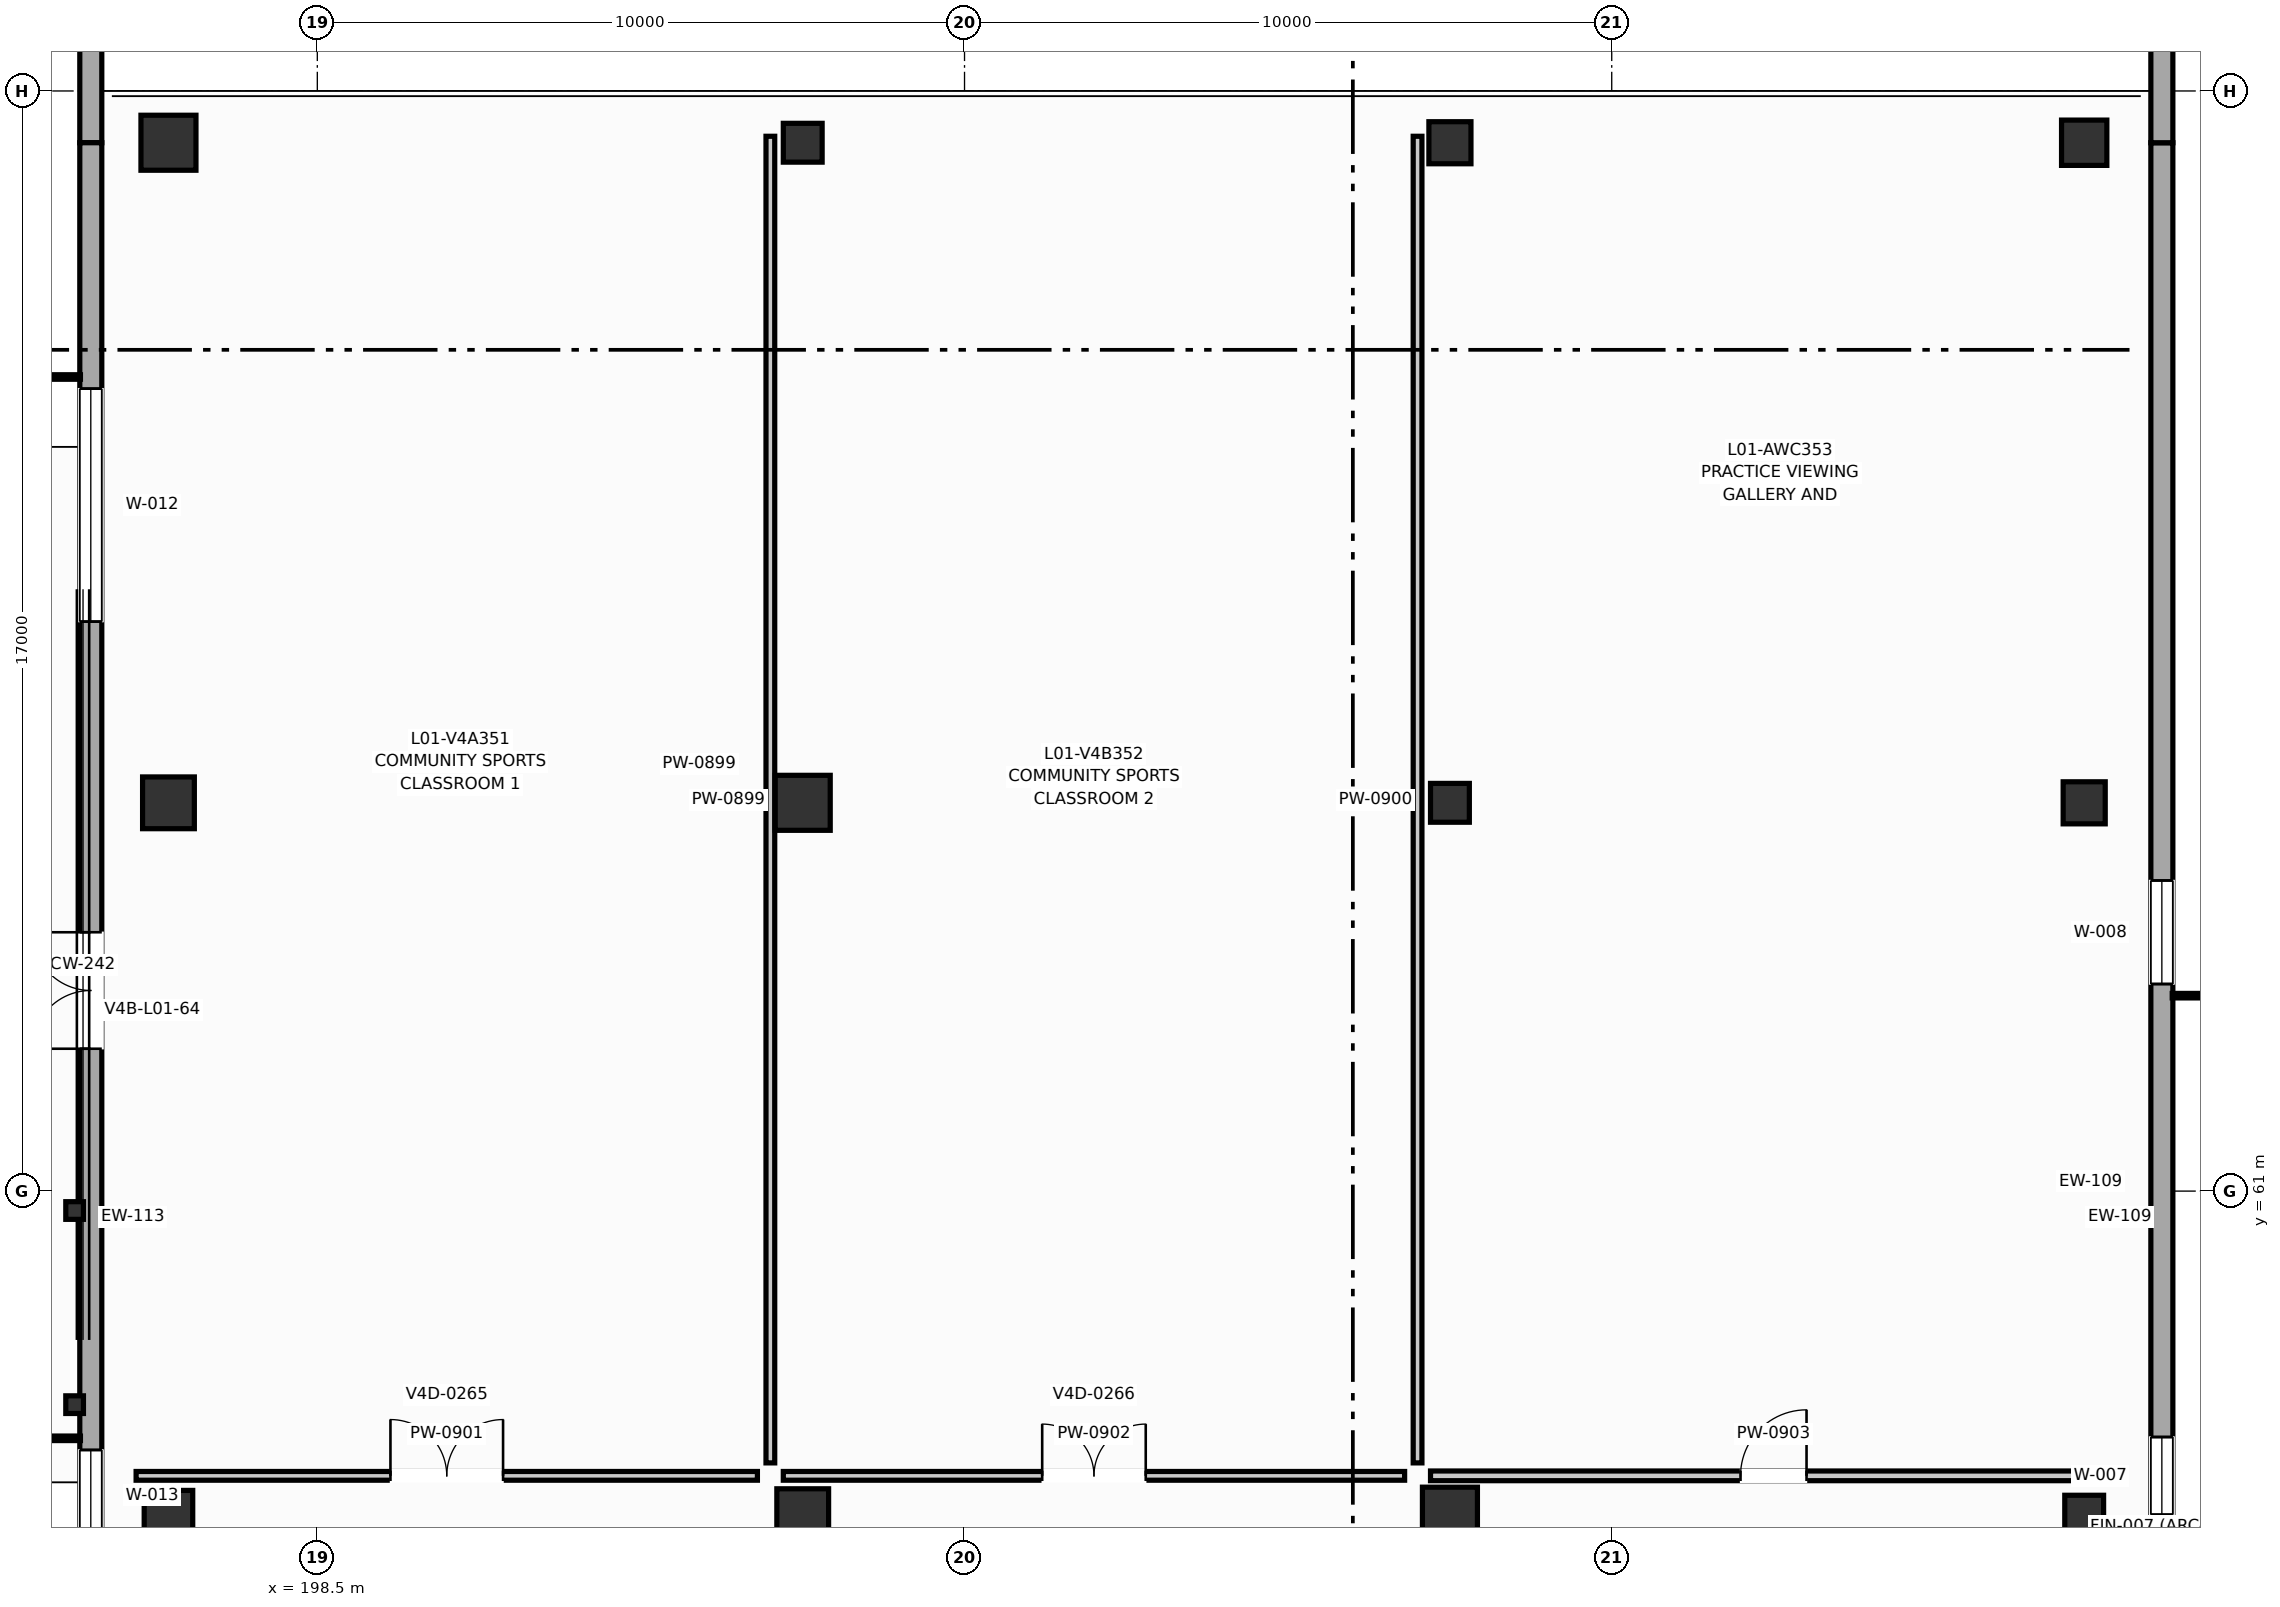
"""IFC4 building model, lengths in metres.
Left out: names, types, materials, properties, quantities, classifications, styles, units other than length and angle.
Written with IfcOpenShell. Run it as: python <this file> out.ifc"""

import sys

from ifc_helpers import new_model, si_unit, direction, frame, frame_2d, origin, origin_2d, place, context, subcontext, project, spatial, rectangle, hollow_circle, extrude, element, fill, save


model = new_model("IFC4")
c1 = context("Model", 3, precision=1e-05, world=origin(), true_north=direction((0.0, 1.0)))
c2 = subcontext(c1, "Body", "Model", "MODEL_VIEW")
j1 = project(units=[si_unit("LENGTHUNIT", "METRE"), si_unit("PLANEANGLEUNIT", "RADIAN")], contexts=[c1])
p1 = place(None, origin())
s1 = spatial("IfcSite", under=j1, at=p1, CompositionType="ELEMENT")
p2 = place(p1, origin())
s2 = spatial("IfcBuilding", under=s1, at=p2, CompositionType="ELEMENT")
p3 = place(p2, frame((0.0, 0.0, 4.5)))
s3 = spatial("IfcBuildingStorey", under=s2, at=p3, CompositionType="ELEMENT", Elevation=4.5)
p4 = place(p3, frame((196.2, 56.0, 0.0), z_axis=(0.0, 0.0, 1.0), x_axis=(1.0, 0.0, 0.0)))
e1 = element("IfcColumn", 1, at=p4, inside=s3, PredefinedType="COLUMN", context=c2, shape_type="SweptSolid", body=[
    extrude(rectangle(XDim=0.75, YDim=0.75, at=origin_2d()), origin(), (0.0, 0.0, 1.0), 4.5),
])
p5 = place(p3, frame((196.2, 67.0, 0.0), z_axis=(0.0, 0.0, 1.0), x_axis=(1.0, 0.0, 0.0)))
e2 = element("IfcColumn", 2, at=p5, inside=s3, PredefinedType="COLUMN", context=c2, shape_type="SweptSolid", body=[
    extrude(rectangle(XDim=0.8, YDim=0.8, at=origin_2d()), origin(), (0.0, 0.0, 1.0), 4.5),
])
p6 = place(p3, frame((196.2, 77.2, 0.0), z_axis=(0.0, 0.0, 1.0), x_axis=(1.0, 0.0, 0.0)))
e3 = element("IfcColumn", 3, at=p6, inside=s3, PredefinedType="COLUMN", context=c2, shape_type="SweptSolid", body=[
    extrude(rectangle(XDim=0.85, YDim=0.85, at=origin_2d()), origin(), (0.0, 0.0, 1.0), 4.5),
])
p7 = place(p3, frame((206.0, 56.0, 0.0), z_axis=(0.0, 0.0, 1.0), x_axis=(1.0, 0.0, 0.0)))
e4 = element("IfcColumn", 4, at=p7, inside=s3, PredefinedType="COLUMN", context=c2, shape_type="SweptSolid", body=[
    extrude(rectangle(XDim=0.8, YDim=0.8, at=origin_2d()), origin(), (0.0, 0.0, 1.0), 4.5),
])
p8 = place(p3, frame((206.0, 67.0, 0.0), z_axis=(0.0, 0.0, 1.0), x_axis=(1.0, 0.0, 0.0)))
e5 = element("IfcColumn", 5, at=p8, inside=s3, PredefinedType="COLUMN", context=c2, shape_type="SweptSolid", body=[
    extrude(rectangle(XDim=0.85, YDim=0.85, at=origin_2d()), origin(), (0.0, 0.0, 1.0), 4.5),
])
p9 = place(p3, frame((206.0, 77.2, 0.0), z_axis=(0.0, 0.0, 1.0), x_axis=(1.0, 0.0, 0.0)))
e6 = element("IfcColumn", 6, at=p9, inside=s3, PredefinedType="COLUMN", context=c2, shape_type="SweptSolid", body=[
    extrude(rectangle(XDim=0.6, YDim=0.6, at=origin_2d()), origin(), (0.0, 0.0, 1.0), 4.5),
])
p10 = place(p3, frame((216.0, 56.0, 0.0), z_axis=(0.0, 0.0, 1.0), x_axis=(1.0, 0.0, 0.0)))
e7 = element("IfcColumn", 7, at=p10, inside=s3, PredefinedType="COLUMN", context=c2, shape_type="SweptSolid", body=[
    extrude(rectangle(XDim=0.85, YDim=0.85, at=origin_2d()), origin(), (0.0, 0.0, 1.0), 4.5),
])
p11 = place(p3, frame((216.0, 67.0, 0.0), z_axis=(0.0, 0.0, 1.0), x_axis=(1.0, 0.0, 0.0)))
e8 = element("IfcColumn", 8, at=p11, inside=s3, PredefinedType="COLUMN", context=c2, shape_type="SweptSolid", body=[
    extrude(rectangle(XDim=0.6, YDim=0.6, at=origin_2d()), origin(), (0.0, 0.0, 1.0), 4.5),
])
p12 = place(p3, frame((216.0, 77.2, 0.0), z_axis=(0.0, 0.0, 1.0), x_axis=(1.0, 0.0, 0.0)))
e9 = element("IfcColumn", 9, at=p12, inside=s3, PredefinedType="COLUMN", context=c2, shape_type="SweptSolid", body=[
    extrude(rectangle(XDim=0.65, YDim=0.65, at=origin_2d()), origin(), (0.0, 0.0, 1.0), 4.5),
])
p13 = place(p3, frame((225.8, 56.0, 0.0), z_axis=(0.0, 0.0, 1.0), x_axis=(1.0, 0.0, 0.0)))
e10 = element("IfcColumn", 10, at=p13, inside=s3, PredefinedType="COLUMN", context=c2, shape_type="SweptSolid", body=[
    extrude(rectangle(XDim=0.6, YDim=0.6, at=origin_2d()), origin(), (0.0, 0.0, 1.0), 4.5),
])
p14 = place(p3, frame((225.8, 67.0, 0.0), z_axis=(0.0, 0.0, 1.0), x_axis=(1.0, 0.0, 0.0)))
e11 = element("IfcColumn", 11, at=p14, inside=s3, PredefinedType="COLUMN", context=c2, shape_type="SweptSolid", body=[
    extrude(rectangle(XDim=0.65, YDim=0.65, at=origin_2d()), origin(), (0.0, 0.0, 1.0), 4.5),
])
p15 = place(p3, frame((225.8, 77.2, 0.0), z_axis=(0.0, 0.0, 1.0), x_axis=(1.0, 0.0, 0.0)))
e12 = element("IfcColumn", 12, at=p15, inside=s3, PredefinedType="COLUMN", context=c2, shape_type="SweptSolid", body=[
    extrude(rectangle(XDim=0.7, YDim=0.7, at=origin_2d()), origin(), (0.0, 0.0, 1.0), 4.5),
])
for number, where, z_axis, x_axis in (
    (13, (194.75, 57.7, 0.0), (0.0, 0.0, 1.0), (1.0, 0.0, 0.0)),
    (14, (194.75, 60.7, 0.0), (0.0, 0.0, 1.0), (1.0, 0.0, 0.0)),
):
    element("IfcColumn", number, at=place(p3, frame(where, z_axis=z_axis, x_axis=x_axis)), inside=s3, PredefinedType="COLUMN", context=c2, shape_type="SweptSolid", body=[
        extrude(hollow_circle(Radius=0.136, WallThickness=0.012, at=origin_2d()), origin(), (0.0, 0.0, 1.0), 4.5),
    ])
p16 = place(p3, frame((227.0, 44.0, 0.0), z_axis=(0.0, 0.0, 1.0), x_axis=(0.0, 1.0, 0.0)))
e15 = element("IfcWall", 15, at=p16, inside=s3, PredefinedType="SOLIDWALL", context=c2, shape_type="SweptSolid", body=[
    extrude(rectangle(XDim=33.2, YDim=0.34, at=frame_2d((16.6, 0.0))), origin(), (0.0, 0.0, 1.0), 3.55),
])
p17 = place(p16, frame((3.8, 0.0, 0.85)))
e16 = element("IfcOpeningElement", 16, at=p17, cuts=e15, PredefinedType="OPENING", context=c2, shape_type="SweptSolid", body=[
    extrude(rectangle(XDim=1.5, YDim=2.2, at=frame_2d((0.75, 1.1))), frame((0.0, 0.18, 0.0), z_axis=(0.0, -1.0, 0.0), x_axis=(1.0, 0.0, 0.0)), (0.0, 0.0, 1.0), 0.36),
])
p18 = place(p16, frame((12.0, 0.0, 0.85)))
e17 = element("IfcOpeningElement", 17, at=p18, cuts=e15, PredefinedType="OPENING", context=c2, shape_type="SweptSolid", body=[
    extrude(rectangle(XDim=1.2, YDim=1.8, at=frame_2d((0.6, 0.9))), frame((0.0, 0.18, 0.0), z_axis=(0.0, -1.0, 0.0), x_axis=(1.0, 0.0, 0.0)), (0.0, 0.0, 1.0), 0.36),
])
p19 = place(p16, frame((20.2, 0.0, 0.85)))
e18 = element("IfcOpeningElement", 18, at=p19, cuts=e15, PredefinedType="OPENING", context=c2, shape_type="SweptSolid", body=[
    extrude(rectangle(XDim=1.6, YDim=1.8, at=frame_2d((0.8, 0.9))), frame((0.0, 0.18, 0.0), z_axis=(0.0, -1.0, 0.0), x_axis=(1.0, 0.0, 0.0)), (0.0, 0.0, 1.0), 0.36),
])
p20 = place(p3, frame((227.0, 77.2, 0.0), z_axis=(0.0, 0.0, 1.0), x_axis=(0.0, 1.0, 0.0)))
e19 = element("IfcWall", 19, at=p20, inside=s3, PredefinedType="SOLIDWALL", context=c2, shape_type="SweptSolid", body=[
    extrude(rectangle(XDim=34.8, YDim=0.34, at=frame_2d((17.4, 0.0))), origin(), (0.0, 0.0, 1.0), 4.5),
])
p21 = place(p20, frame((3.8, 0.0, 0.85)))
e20 = element("IfcOpeningElement", 20, at=p21, cuts=e19, PredefinedType="OPENING", context=c2, shape_type="SweptSolid", body=[
    extrude(rectangle(XDim=2.0, YDim=1.6, at=frame_2d((1.0, 0.8))), frame((0.0, 0.18, 0.0), z_axis=(0.0, -1.0, 0.0), x_axis=(1.0, 0.0, 0.0)), (0.0, 0.0, 1.0), 0.36),
])
p22 = place(p20, frame((12.0, 0.0, 0.85)))
e21 = element("IfcOpeningElement", 21, at=p22, cuts=e19, PredefinedType="OPENING", context=c2, shape_type="SweptSolid", body=[
    extrude(rectangle(XDim=2.6, YDim=1.5, at=frame_2d((1.3, 0.75))), frame((0.0, 0.18, 0.0), z_axis=(0.0, -1.0, 0.0), x_axis=(1.0, 0.0, 0.0)), (0.0, 0.0, 1.0), 0.36),
])
p23 = place(p20, frame((20.2, 0.0, 0.85)))
e22 = element("IfcOpeningElement", 22, at=p23, cuts=e19, PredefinedType="OPENING", context=c2, shape_type="SweptSolid", body=[
    extrude(rectangle(XDim=3.2, YDim=1.6, at=frame_2d((1.6, 0.8))), frame((0.0, 0.18, 0.0), z_axis=(0.0, -1.0, 0.0), x_axis=(1.0, 0.0, 0.0)), (0.0, 0.0, 1.0), 0.36),
])
p24 = place(p3, frame((195.0, 112.0, 0.0), z_axis=(0.0, 0.0, 1.0), x_axis=(0.0, -1.0, 0.0)))
e23 = element("IfcWall", 23, at=p24, inside=s3, PredefinedType="SOLIDWALL", context=c2, shape_type="SweptSolid", body=[
    extrude(rectangle(XDim=34.8, YDim=0.34, at=frame_2d((17.4, 0.0))), origin(), (0.0, 0.0, 1.0), 4.5),
])
p25 = place(p3, frame((195.0, 77.2, 0.0), z_axis=(0.0, 0.0, 1.0), x_axis=(0.0, -1.0, 0.0)))
e24 = element("IfcWall", 24, at=p25, inside=s3, PredefinedType="SOLIDWALL", context=c2, shape_type="SweptSolid", body=[
    extrude(rectangle(XDim=33.2, YDim=0.34, at=frame_2d((16.6, 0.0))), origin(), (0.0, 0.0, 1.0), 3.55),
])
p26 = place(p25, frame((12.2, 0.0, 0.0)))
e25 = element("IfcOpeningElement", 25, at=p26, cuts=e24, PredefinedType="OPENING", context=c2, shape_type="SweptSolid", body=[
    extrude(rectangle(XDim=1.8, YDim=2.35, at=frame_2d((0.9, 1.175))), frame((0.0, 0.18, 0.0), z_axis=(0.0, -1.0, 0.0), x_axis=(1.0, 0.0, 0.0)), (0.0, 0.0, 1.0), 0.36),
])
p27 = place(p25, frame((3.8, 0.0, 0.85)))
e26 = element("IfcOpeningElement", 26, at=p27, cuts=e24, PredefinedType="OPENING", context=c2, shape_type="SweptSolid", body=[
    extrude(rectangle(XDim=3.6, YDim=2.2, at=frame_2d((1.8, 1.1))), frame((0.0, 0.18, 0.0), z_axis=(0.0, -1.0, 0.0), x_axis=(1.0, 0.0, 0.0)), (0.0, 0.0, 1.0), 0.36),
])
p28 = place(p25, frame((20.2, 0.0, 0.85)))
e27 = element("IfcOpeningElement", 27, at=p28, cuts=e24, PredefinedType="OPENING", context=c2, shape_type="SweptSolid", body=[
    extrude(rectangle(XDim=1.4, YDim=2.6, at=frame_2d((0.7, 1.3))), frame((0.0, 0.18, 0.0), z_axis=(0.0, -1.0, 0.0), x_axis=(1.0, 0.0, 0.0)), (0.0, 0.0, 1.0), 0.36),
])
for number, where, z_axis, x_axis in (
    (28, (205.5, 56.8, 0.0), (0.0, 0.0, 1.0), (0.0, 1.0, 0.0)),
    (29, (215.5, 56.8, 0.0), (0.0, 0.0, 1.0), (0.0, 1.0, 0.0)),
):
    element("IfcWall", number, at=place(p3, frame(where, z_axis=z_axis, x_axis=x_axis)), inside=s3, PredefinedType="PARTITIONING", context=c2, shape_type="SweptSolid", body=[
        extrude(rectangle(XDim=20.5, YDim=0.135, at=frame_2d((10.25, 0.0))), origin(), (0.0, 0.0, 1.0), 3.22),
    ])
p29 = place(p3, frame((195.7, 56.6, 0.0), z_axis=(0.0, 0.0, 1.0), x_axis=(1.0, 0.0, 0.0)))
e30 = element("IfcWall", 30, at=p29, inside=s3, PredefinedType="PARTITIONING", context=c2, shape_type="SweptSolid", body=[
    extrude(rectangle(XDim=9.6, YDim=0.135, at=frame_2d((4.8, 0.0))), origin(), (0.0, 0.0, 1.0), 3.22),
])
p30 = place(p29, frame((3.93, 0.0, 0.0)))
e31 = element("IfcOpeningElement", 31, at=p30, cuts=e30, PredefinedType="OPENING", context=c2, shape_type="SweptSolid", body=[
    extrude(rectangle(XDim=1.74, YDim=2.3, at=frame_2d((0.87, 1.15))), frame((0.0, 0.077, 0.0), z_axis=(0.0, -1.0, 0.0), x_axis=(1.0, 0.0, 0.0)), (0.0, 0.0, 1.0), 0.155),
])
p31 = place(p3, frame((205.7, 56.6, 0.0), z_axis=(0.0, 0.0, 1.0), x_axis=(1.0, 0.0, 0.0)))
e32 = element("IfcWall", 32, at=p31, inside=s3, PredefinedType="PARTITIONING", context=c2, shape_type="SweptSolid", body=[
    extrude(rectangle(XDim=9.6, YDim=0.135, at=frame_2d((4.8, 0.0))), origin(), (0.0, 0.0, 1.0), 3.22),
])
p32 = place(p31, frame((4.0, 0.0, 0.0)))
e33 = element("IfcOpeningElement", 33, at=p32, cuts=e32, PredefinedType="OPENING", context=c2, shape_type="SweptSolid", body=[
    extrude(rectangle(XDim=1.6, YDim=2.25, at=frame_2d((0.8, 1.125))), frame((0.0, 0.077, 0.0), z_axis=(0.0, -1.0, 0.0), x_axis=(1.0, 0.0, 0.0)), (0.0, 0.0, 1.0), 0.155),
])
p33 = place(p3, frame((215.7, 56.6, 0.0), z_axis=(0.0, 0.0, 1.0), x_axis=(1.0, 0.0, 0.0)))
e34 = element("IfcWall", 34, at=p33, inside=s3, PredefinedType="PARTITIONING", context=c2, shape_type="SweptSolid", body=[
    extrude(rectangle(XDim=10.6, YDim=0.15, at=frame_2d((5.3, 0.0))), origin(), (0.0, 0.0, 1.0), 3.22),
])
p34 = place(p33, frame((4.79, 0.0, 0.0)))
e35 = element("IfcOpeningElement", 35, at=p34, cuts=e34, PredefinedType="OPENING", context=c2, shape_type="SweptSolid", body=[
    extrude(rectangle(XDim=1.02, YDim=2.15, at=frame_2d((0.51, 1.075))), frame((0.0, 0.085, 0.0), z_axis=(0.0, -1.0, 0.0), x_axis=(1.0, 0.0, 0.0)), (0.0, 0.0, 1.0), 0.17),
])
p35 = place(p18, origin())
e36 = element("IfcWindow", 36, at=p35, inside=s3, PartitioningType="SINGLE_PANEL", PredefinedType="WINDOW", context=c2, shape_type="SweptSolid", body=[
    extrude(rectangle(XDim=1.2, YDim=1.8, at=frame_2d((0.6, 0.9))), frame((0.0, 0.03, 0.0), z_axis=(0.0, -1.0, 0.0), x_axis=(1.0, 0.0, 0.0)), (0.0, 0.0, 1.0), 0.06),
])
fill(e17, e36)
p36 = place(p19, origin())
e37 = element("IfcWindow", 37, at=p36, inside=s3, PartitioningType="SINGLE_PANEL", PredefinedType="WINDOW", context=c2, shape_type="SweptSolid", body=[
    extrude(rectangle(XDim=1.6, YDim=1.8, at=frame_2d((0.8, 0.9))), frame((0.0, 0.03, 0.0), z_axis=(0.0, -1.0, 0.0), x_axis=(1.0, 0.0, 0.0)), (0.0, 0.0, 1.0), 0.06),
])
fill(e18, e37)
p37 = place(p26, frame((1.8, 0.0, 0.0), z_axis=(0.0, 0.0, 1.0), x_axis=(-1.0, 0.0, 0.0)))
e38 = element("IfcDoor", 38, at=p37, inside=s3, OperationType="DOUBLE_DOOR_SINGLE_SWING", PredefinedType="DOOR", context=c2, shape_type="SweptSolid", body=[
    extrude(rectangle(XDim=1.8, YDim=2.35, at=frame_2d((0.9, 1.175))), frame((0.0, 0.025, 0.0), z_axis=(0.0, -1.0, 0.0), x_axis=(1.0, 0.0, 0.0)), (0.0, 0.0, 1.0), 0.05),
])
fill(e25, e38)
p38 = place(p27, origin())
e39 = element("IfcWindow", 39, at=p38, inside=s3, PartitioningType="SINGLE_PANEL", PredefinedType="WINDOW", context=c2, shape_type="SweptSolid", body=[
    extrude(rectangle(XDim=3.6, YDim=2.2, at=frame_2d((1.8, 1.1))), frame((0.0, 0.03, 0.0), z_axis=(0.0, -1.0, 0.0), x_axis=(1.0, 0.0, 0.0)), (0.0, 0.0, 1.0), 0.06),
])
fill(e26, e39)
p39 = place(p28, origin())
e40 = element("IfcWindow", 40, at=p39, inside=s3, PartitioningType="SINGLE_PANEL", PredefinedType="WINDOW", context=c2, shape_type="SweptSolid", body=[
    extrude(rectangle(XDim=1.4, YDim=2.6, at=frame_2d((0.7, 1.3))), frame((0.0, 0.03, 0.0), z_axis=(0.0, -1.0, 0.0), x_axis=(1.0, 0.0, 0.0)), (0.0, 0.0, 1.0), 0.06),
])
fill(e27, e40)
p40 = place(p30, origin())
e41 = element("IfcDoor", 41, at=p40, inside=s3, OperationType="DOUBLE_DOOR_SINGLE_SWING", PredefinedType="DOOR", context=c2, shape_type="SweptSolid", body=[
    extrude(rectangle(XDim=1.74, YDim=2.3, at=frame_2d((0.87, 1.15))), frame((0.0, 0.025, 0.0), z_axis=(0.0, -1.0, 0.0), x_axis=(1.0, 0.0, 0.0)), (0.0, 0.0, 1.0), 0.05),
])
fill(e31, e41)
p41 = place(p32, origin())
e42 = element("IfcDoor", 42, at=p41, inside=s3, OperationType="DOUBLE_DOOR_SINGLE_SWING", PredefinedType="DOOR", context=c2, shape_type="SweptSolid", body=[
    extrude(rectangle(XDim=1.6, YDim=2.25, at=frame_2d((0.8, 1.125))), frame((0.0, 0.025, 0.0), z_axis=(0.0, -1.0, 0.0), x_axis=(1.0, 0.0, 0.0)), (0.0, 0.0, 1.0), 0.05),
])
fill(e33, e42)
p42 = place(p34, origin())
e43 = element("IfcDoor", 43, at=p42, inside=s3, OperationType="SINGLE_SWING_RIGHT", PredefinedType="DOOR", context=c2, shape_type="SweptSolid", body=[
    extrude(rectangle(XDim=1.02, YDim=2.15, at=frame_2d((0.51, 1.075))), frame((0.0, 0.025, 0.0), z_axis=(0.0, -1.0, 0.0), x_axis=(1.0, 0.0, 0.0)), (0.0, 0.0, 1.0), 0.05),
])
fill(e35, e43)
save(model, sys.argv[1])
